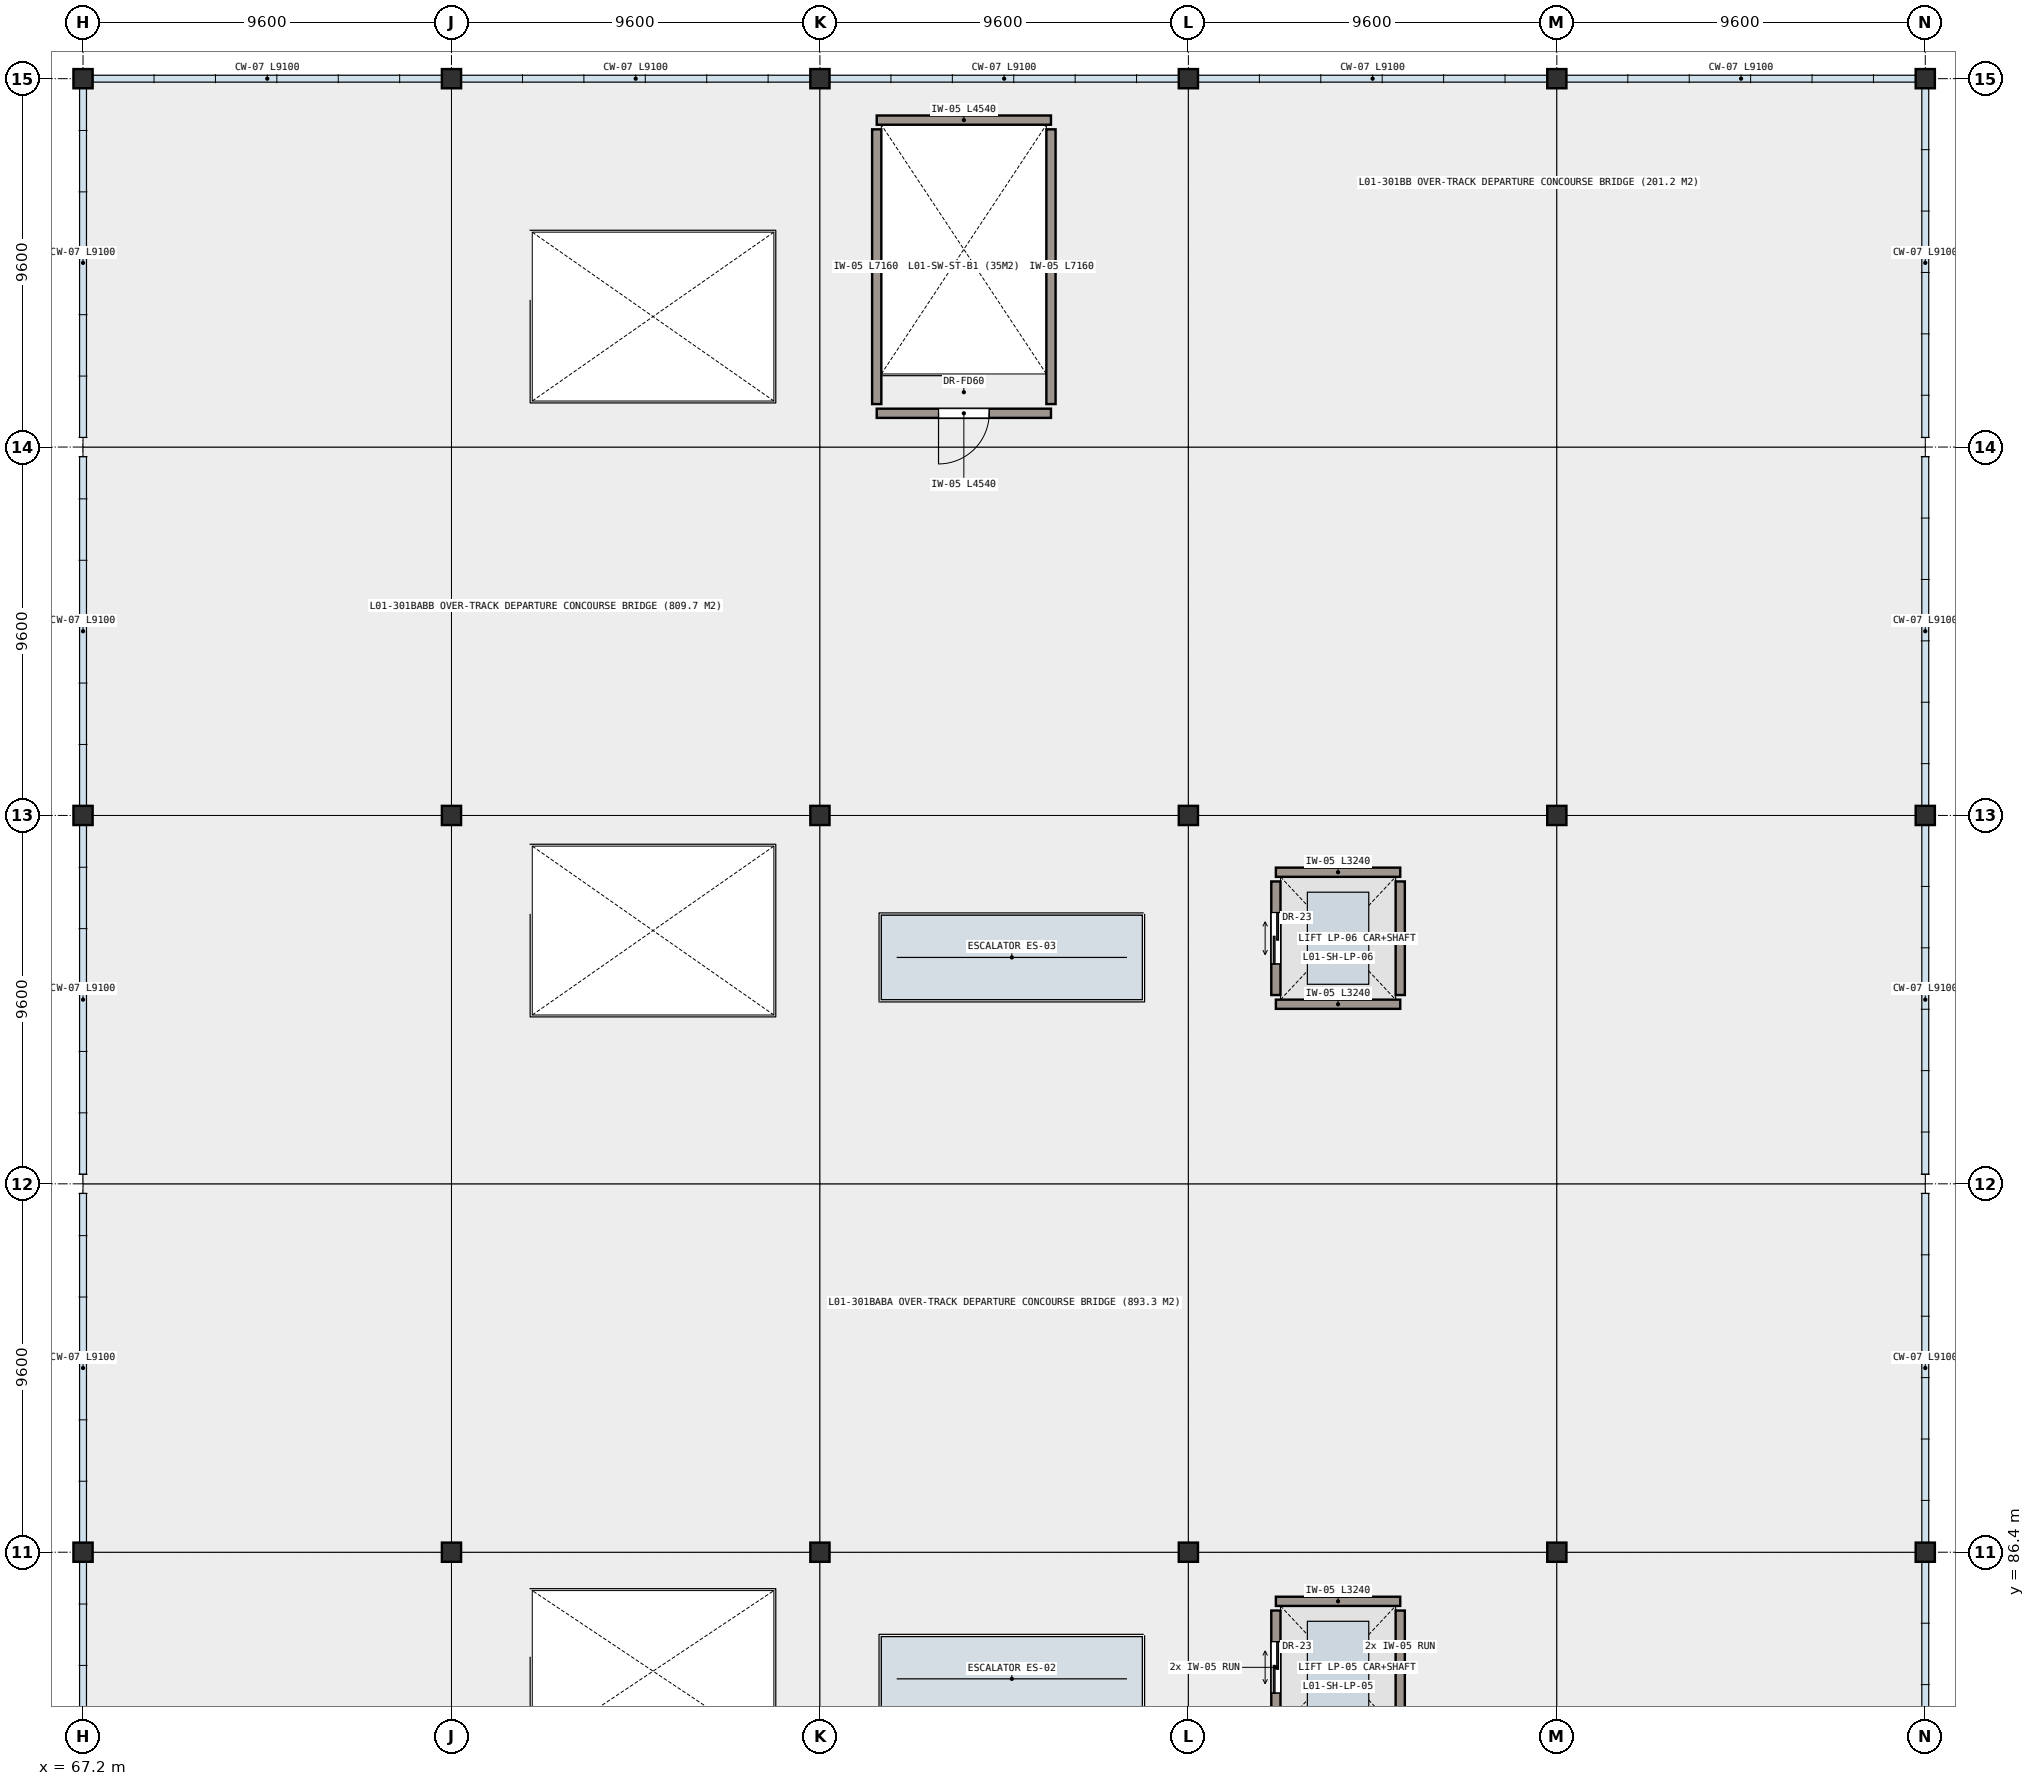
"""IFC4 building model, lengths in metres.
Left out: names, types, materials, properties, quantities, classifications, styles, units other than length and angle.
Written with IfcOpenShell. Run it as: python <this file> out.ifc"""

import sys

from ifc_helpers import new_model, si_unit, direction, frame, frame_2d, origin, origin_2d, place, context, subcontext, project, spatial, rectangle, hollow_rectangle, extrude, element, fill, save


model = new_model("IFC4")
c1 = context("Model", 3, precision=1e-05, world=origin(), true_north=direction((0.0, 1.0)))
c2 = subcontext(c1, "Body", "Model", "MODEL_VIEW")
j1 = project(units=[si_unit("LENGTHUNIT", "METRE"), si_unit("PLANEANGLEUNIT", "RADIAN")], contexts=[c1])
p1 = place(None, origin())
s1 = spatial("IfcSite", under=j1, at=p1, CompositionType="ELEMENT")
p2 = place(p1, origin())
s2 = spatial("IfcBuilding", under=s1, at=p2, CompositionType="ELEMENT")
p3 = place(p2, frame((0.0, 0.0, 5.4)))
s3 = spatial("IfcBuildingStorey", under=s2, at=p3, CompositionType="ELEMENT", Elevation=5.4)
for number, where, z_axis, x_axis in (
    (1, (67.2, 86.4, 0.0), (0.0, 0.0, 1.0), (1.0, 0.0, 0.0)),
    (2, (67.2, 105.6, 0.0), (0.0, 0.0, 1.0), (1.0, 0.0, 0.0)),
    (3, (67.2, 124.8, 0.0), (0.0, 0.0, 1.0), (1.0, 0.0, 0.0)),
    (4, (76.8, 86.4, 0.0), (0.0, 0.0, 1.0), (1.0, 0.0, 0.0)),
    (5, (76.8, 105.6, 0.0), (0.0, 0.0, 1.0), (1.0, 0.0, 0.0)),
    (6, (76.8, 124.8, 0.0), (0.0, 0.0, 1.0), (1.0, 0.0, 0.0)),
    (7, (86.4, 86.4, 0.0), (0.0, 0.0, 1.0), (1.0, 0.0, 0.0)),
    (8, (86.4, 105.6, 0.0), (0.0, 0.0, 1.0), (1.0, 0.0, 0.0)),
    (9, (86.4, 124.8, 0.0), (0.0, 0.0, 1.0), (1.0, 0.0, 0.0)),
    (10, (96.0, 86.4, 0.0), (0.0, 0.0, 1.0), (1.0, 0.0, 0.0)),
    (11, (96.0, 105.6, 0.0), (0.0, 0.0, 1.0), (1.0, 0.0, 0.0)),
    (12, (96.0, 124.8, 0.0), (0.0, 0.0, 1.0), (1.0, 0.0, 0.0)),
    (13, (105.6, 86.4, 0.0), (0.0, 0.0, 1.0), (1.0, 0.0, 0.0)),
    (14, (105.6, 105.6, 0.0), (0.0, 0.0, 1.0), (1.0, 0.0, 0.0)),
    (15, (105.6, 124.8, 0.0), (0.0, 0.0, 1.0), (1.0, 0.0, 0.0)),
    (16, (115.2, 86.4, 0.0), (0.0, 0.0, 1.0), (1.0, 0.0, 0.0)),
    (17, (115.2, 105.6, 0.0), (0.0, 0.0, 1.0), (1.0, 0.0, 0.0)),
    (18, (115.2, 124.8, 0.0), (0.0, 0.0, 1.0), (1.0, 0.0, 0.0)),
):
    element("IfcColumn", number, at=place(p3, frame(where, z_axis=z_axis, x_axis=x_axis)), inside=s3, PredefinedType="COLUMN", context=c2, shape_type="SweptSolid", body=[
        extrude(hollow_rectangle(XDim=0.5, YDim=0.5, WallThickness=0.025, at=origin_2d()), origin(), (0.0, 0.0, 1.0), 4.8),
    ])
p4 = place(p3, frame((98.28, 85.12, 0.0), z_axis=(0.0, 0.0, 1.0), x_axis=(1.0, 0.0, 0.0)))
e19 = element("IfcWall", 19, at=p4, inside=s3, PredefinedType="SHEAR", context=c2, shape_type="SweptSolid", body=[
    extrude(rectangle(XDim=3.24, YDim=0.24, at=frame_2d((1.62, 0.0))), origin(), (0.0, 0.0, 1.0), 4.54),
])
p5 = place(p3, frame((98.28, 81.92, 0.0), z_axis=(0.0, 0.0, 1.0), x_axis=(0.0, 1.0, 0.0)))
e20 = element("IfcWall", 20, at=p5, inside=s3, PredefinedType="SHEAR", context=c2, shape_type="SweptSolid", body=[
    extrude(rectangle(XDim=2.96, YDim=0.24, at=frame_2d((1.48, 0.0))), origin(), (0.0, 0.0, 1.0), 4.54),
])
p6 = place(p5, frame((0.81, 0.0, 0.0)))
e21 = element("IfcOpeningElement", 21, at=p6, cuts=e20, PredefinedType="OPENING", context=c2, shape_type="SweptSolid", body=[
    extrude(rectangle(XDim=1.34, YDim=2.18, at=frame_2d((0.67, 1.09))), frame((0.0, 0.13, 0.0), z_axis=(0.0, -1.0, 0.0), x_axis=(1.0, 0.0, 0.0)), (0.0, 0.0, 1.0), 0.26),
])
p7 = place(p3, frame((101.52, 84.88, 0.0), z_axis=(0.0, 0.0, 1.0), x_axis=(0.0, -1.0, 0.0)))
e22 = element("IfcWall", 22, at=p7, inside=s3, PredefinedType="SHEAR", context=c2, shape_type="SweptSolid", body=[
    extrude(rectangle(XDim=2.96, YDim=0.24, at=frame_2d((1.48, 0.0))), origin(), (0.0, 0.0, 1.0), 4.54),
])
for number, where, z_axis, x_axis in (
    (23, (101.52, 100.68, 0.0), (0.0, 0.0, 1.0), (-1.0, 0.0, 0.0)),
    (24, (98.28, 104.12, 0.0), (0.0, 0.0, 1.0), (1.0, 0.0, 0.0)),
):
    element("IfcWall", number, at=place(p3, frame(where, z_axis=z_axis, x_axis=x_axis)), inside=s3, PredefinedType="SHEAR", context=c2, shape_type="SweptSolid", body=[
        extrude(rectangle(XDim=3.24, YDim=0.24, at=frame_2d((1.62, 0.0))), origin(), (0.0, 0.0, 1.0), 4.54),
    ])
p8 = place(p3, frame((98.28, 100.92, 0.0), z_axis=(0.0, 0.0, 1.0), x_axis=(0.0, 1.0, 0.0)))
e25 = element("IfcWall", 25, at=p8, inside=s3, PredefinedType="SHEAR", context=c2, shape_type="SweptSolid", body=[
    extrude(rectangle(XDim=2.96, YDim=0.24, at=frame_2d((1.48, 0.0))), origin(), (0.0, 0.0, 1.0), 4.54),
])
p9 = place(p8, frame((0.81, 0.0, 0.0)))
e26 = element("IfcOpeningElement", 26, at=p9, cuts=e25, PredefinedType="OPENING", context=c2, shape_type="SweptSolid", body=[
    extrude(rectangle(XDim=1.34, YDim=2.18, at=frame_2d((0.67, 1.09))), frame((0.0, 0.13, 0.0), z_axis=(0.0, -1.0, 0.0), x_axis=(1.0, 0.0, 0.0)), (0.0, 0.0, 1.0), 0.26),
])
p10 = place(p3, frame((101.52, 103.88, 0.0), z_axis=(0.0, 0.0, 1.0), x_axis=(0.0, -1.0, 0.0)))
e27 = element("IfcWall", 27, at=p10, inside=s3, PredefinedType="SHEAR", context=c2, shape_type="SweptSolid", body=[
    extrude(rectangle(XDim=2.96, YDim=0.24, at=frame_2d((1.48, 0.0))), origin(), (0.0, 0.0, 1.0), 4.54),
])
p11 = place(p3, frame((92.42, 116.08, 0.0), z_axis=(0.0, 0.0, 1.0), x_axis=(-1.0, 0.0, 0.0)))
e28 = element("IfcWall", 28, at=p11, inside=s3, PredefinedType="SHEAR", context=c2, shape_type="SweptSolid", body=[
    extrude(rectangle(XDim=4.54, YDim=0.24, at=frame_2d((2.27, 0.0))), origin(), (0.0, 0.0, 1.0), 4.54),
])
p12 = place(p11, frame((1.61, 0.0, 0.0)))
e29 = element("IfcOpeningElement", 29, at=p12, cuts=e28, PredefinedType="OPENING", context=c2, shape_type="SweptSolid", body=[
    extrude(rectangle(XDim=1.32, YDim=2.15, at=frame_2d((0.66, 1.075))), frame((0.0, 0.13, 0.0), z_axis=(0.0, -1.0, 0.0), x_axis=(1.0, 0.0, 0.0)), (0.0, 0.0, 1.0), 0.26),
])
p13 = place(p3, frame((87.88, 123.72, 0.0), z_axis=(0.0, 0.0, 1.0), x_axis=(1.0, 0.0, 0.0)))
e30 = element("IfcWall", 30, at=p13, inside=s3, PredefinedType="SHEAR", context=c2, shape_type="SweptSolid", body=[
    extrude(rectangle(XDim=4.54, YDim=0.24, at=frame_2d((2.27, 0.0))), origin(), (0.0, 0.0, 1.0), 4.54),
])
for number, where, z_axis, x_axis in (
    (31, (87.88, 116.32, 0.0), (0.0, 0.0, 1.0), (0.0, 1.0, 0.0)),
    (32, (92.42, 123.48, 0.0), (0.0, 0.0, 1.0), (0.0, -1.0, 0.0)),
):
    element("IfcWall", number, at=place(p3, frame(where, z_axis=z_axis, x_axis=x_axis)), inside=s3, PredefinedType="SHEAR", context=c2, shape_type="SweptSolid", body=[
        extrude(rectangle(XDim=7.16, YDim=0.24, at=frame_2d((3.58, 0.0))), origin(), (0.0, 0.0, 1.0), 4.54),
    ])
p14 = place(p6, origin())
e33 = element("IfcDoor", 33, at=p14, inside=s3, OperationType="DOUBLE_DOOR_SLIDING", PredefinedType="DOOR", context=c2, shape_type="SweptSolid", body=[
    extrude(rectangle(XDim=1.34, YDim=2.18, at=frame_2d((0.67, 1.09))), frame((0.0, 0.025, 0.0), z_axis=(0.0, -1.0, 0.0), x_axis=(1.0, 0.0, 0.0)), (0.0, 0.0, 1.0), 0.05),
])
fill(e21, e33)
p15 = place(p9, origin())
e34 = element("IfcDoor", 34, at=p15, inside=s3, OperationType="DOUBLE_DOOR_SLIDING", PredefinedType="DOOR", context=c2, shape_type="SweptSolid", body=[
    extrude(rectangle(XDim=1.34, YDim=2.18, at=frame_2d((0.67, 1.09))), frame((0.0, 0.025, 0.0), z_axis=(0.0, -1.0, 0.0), x_axis=(1.0, 0.0, 0.0)), (0.0, 0.0, 1.0), 0.05),
])
fill(e26, e34)
p16 = place(p12, origin())
e35 = element("IfcDoor", 35, at=p16, inside=s3, OperationType="SINGLE_SWING_RIGHT", PredefinedType="DOOR", context=c2, shape_type="SweptSolid", body=[
    extrude(rectangle(XDim=1.32, YDim=2.15, at=frame_2d((0.66, 1.075))), frame((0.0, 0.025, 0.0), z_axis=(0.0, -1.0, 0.0), x_axis=(1.0, 0.0, 0.0)), (0.0, 0.0, 1.0), 0.05),
])
fill(e29, e35)
save(model, sys.argv[1])
